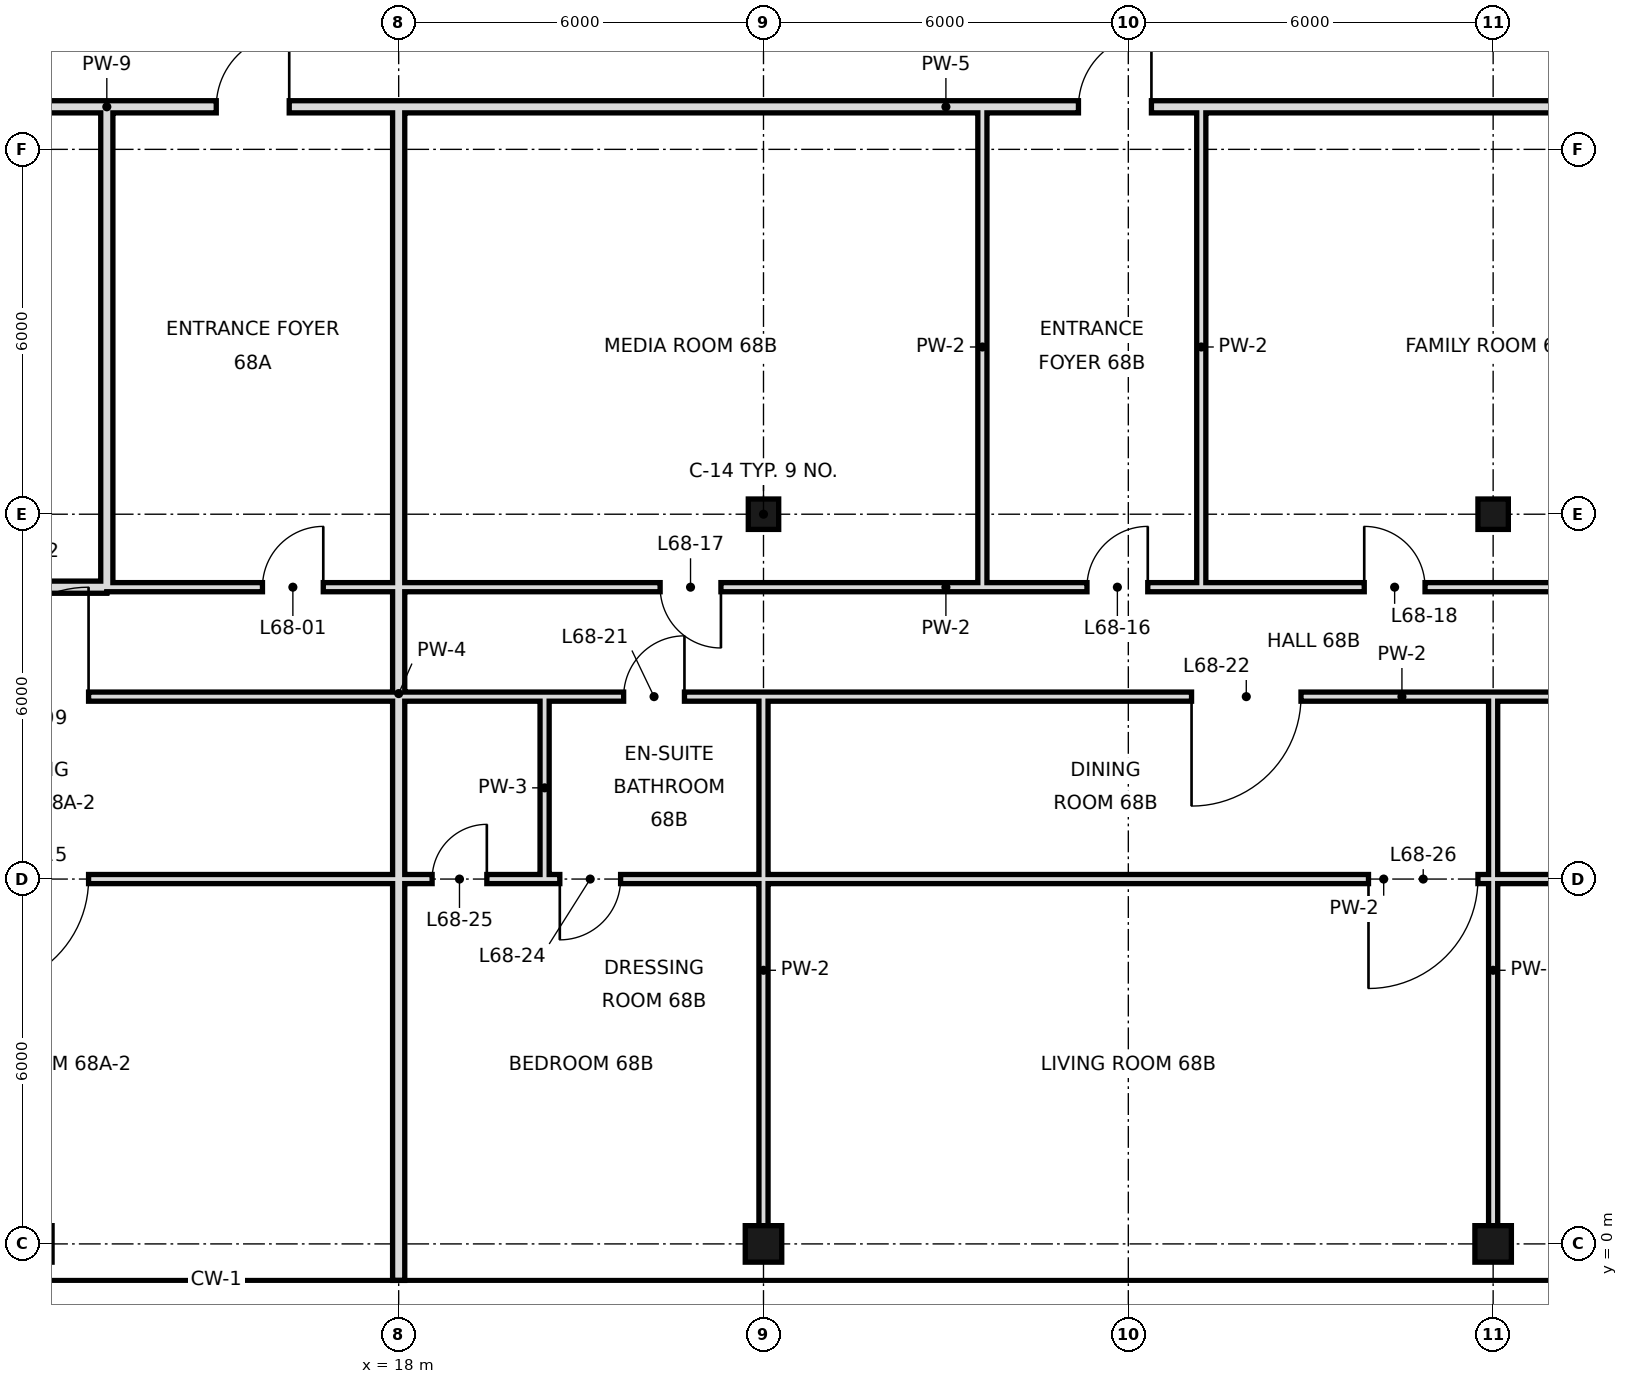
"""IFC4 building model, lengths in metres.
Left out: names, types, materials, properties, quantities, classifications, styles, units other than length and angle.
Written with IfcOpenShell. Run it as: python <this file> out.ifc"""

import sys

from ifc_helpers import new_model, si_unit, direction, frame, frame_2d, origin, origin_2d, place, context, subcontext, project, spatial, rectangle, hollow_rectangle, extrude, element, fill, save


model = new_model("IFC4")
c1 = context("Model", 3, precision=1e-05, world=origin(), true_north=direction((0.0, 1.0)))
c2 = subcontext(c1, "Body", "Model", "MODEL_VIEW")
j1 = project(units=[si_unit("LENGTHUNIT", "METRE"), si_unit("PLANEANGLEUNIT", "RADIAN")], contexts=[c1])
p1 = place(None, origin())
s1 = spatial("IfcSite", under=j1, at=p1, CompositionType="ELEMENT")
p2 = place(p1, origin())
s2 = spatial("IfcBuilding", under=s1, at=p2, CompositionType="ELEMENT")
p3 = place(p2, frame((0.0, 0.0, 290.8)))
s3 = spatial("IfcBuildingStorey", under=s2, at=p3, CompositionType="ELEMENT", Elevation=290.8)
p4 = place(p3, frame((24.0, 0.0, 0.0), z_axis=(0.0, 0.0, 1.0), x_axis=(1.0, 0.0, 0.0)))
e1 = element("IfcColumn", 1, at=p4, inside=s3, PredefinedType="COLUMN", context=c2, shape_type="SweptSolid", body=[
    extrude(hollow_rectangle(XDim=0.6, YDim=0.6, WallThickness=0.028, at=origin_2d()), origin(), (0.0, 0.0, 1.0), 3.6),
])
p5 = place(p3, frame((24.0, 12.0, 0.0), z_axis=(0.0, 0.0, 1.0), x_axis=(1.0, 0.0, 0.0)))
e2 = element("IfcColumn", 2, at=p5, inside=s3, PredefinedType="COLUMN", context=c2, shape_type="SweptSolid", body=[
    extrude(hollow_rectangle(XDim=0.5, YDim=0.5, WallThickness=0.025, at=origin_2d()), origin(), (0.0, 0.0, 1.0), 3.6),
])
p6 = place(p3, frame((36.0, 0.0, 0.0), z_axis=(0.0, 0.0, 1.0), x_axis=(1.0, 0.0, 0.0)))
e3 = element("IfcColumn", 3, at=p6, inside=s3, PredefinedType="COLUMN", context=c2, shape_type="SweptSolid", body=[
    extrude(hollow_rectangle(XDim=0.6, YDim=0.6, WallThickness=0.028, at=origin_2d()), origin(), (0.0, 0.0, 1.0), 3.6),
])
p7 = place(p3, frame((36.0, 12.0, 0.0), z_axis=(0.0, 0.0, 1.0), x_axis=(1.0, 0.0, 0.0)))
e4 = element("IfcColumn", 4, at=p7, inside=s3, PredefinedType="COLUMN", context=c2, shape_type="SweptSolid", body=[
    extrude(hollow_rectangle(XDim=0.5, YDim=0.5, WallThickness=0.025, at=origin_2d()), origin(), (0.0, 0.0, 1.0), 3.6),
])
p8 = place(p3, frame((13.2, 10.8, 0.0), z_axis=(0.0, 0.0, 1.0), x_axis=(0.0, 1.0, 0.0)))
e5 = element("IfcWall", 5, at=p8, inside=s3, PredefinedType="SOLIDWALL", context=c2, shape_type="SweptSolid", body=[
    extrude(rectangle(XDim=7.9, YDim=0.2, at=frame_2d((3.95, 0.0))), origin(), (0.0, 0.0, 1.0), 2.72),
])
p9 = place(p3, frame((18.0, -0.6, 0.0), z_axis=(0.0, 0.0, 1.0), x_axis=(0.0, 1.0, 0.0)))
e6 = element("IfcWall", 6, at=p9, inside=s3, PredefinedType="SOLIDWALL", context=c2, shape_type="SweptSolid", body=[
    extrude(rectangle(XDim=19.3, YDim=0.2, at=frame_2d((9.65, 0.0))), origin(), (0.0, 0.0, 1.0), 2.72),
])
p10 = place(p3, frame((20.4, 6.0, 0.0), z_axis=(0.0, 0.0, 1.0), x_axis=(0.0, 1.0, 0.0)))
e7 = element("IfcWall", 7, at=p10, inside=s3, PredefinedType="PARTITIONING", context=c2, shape_type="SweptSolid", body=[
    extrude(rectangle(XDim=3.0, YDim=0.15, at=frame_2d((1.5, 0.0))), origin(), (0.0, 0.0, 1.0), 3.42),
])
p11 = place(p3, frame((24.0, 0.0, 0.0), z_axis=(0.0, 0.0, 1.0), x_axis=(0.0, 1.0, 0.0)))
e8 = element("IfcWall", 8, at=p11, inside=s3, PredefinedType="PARTITIONING", context=c2, shape_type="SweptSolid", body=[
    extrude(rectangle(XDim=9.0, YDim=0.15, at=frame_2d((4.5, 0.0))), origin(), (0.0, 0.0, 1.0), 2.72),
])
for number, where, z_axis, x_axis in (
    (9, (27.6, 10.8, 0.0), (0.0, 0.0, 1.0), (0.0, 1.0, 0.0)),
    (10, (31.2, 10.8, 0.0), (0.0, 0.0, 1.0), (0.0, 1.0, 0.0)),
):
    element("IfcWall", number, at=place(p3, frame(where, z_axis=z_axis, x_axis=x_axis)), inside=s3, PredefinedType="PARTITIONING", context=c2, shape_type="SweptSolid", body=[
        extrude(rectangle(XDim=7.9, YDim=0.15, at=frame_2d((3.95, 0.0))), origin(), (0.0, 0.0, 1.0), 3.42),
    ])
p12 = place(p3, frame((36.0, 0.0, 0.0), z_axis=(0.0, 0.0, 1.0), x_axis=(0.0, 1.0, 0.0)))
e11 = element("IfcWall", 11, at=p12, inside=s3, PredefinedType="PARTITIONING", context=c2, shape_type="SweptSolid", body=[
    extrude(rectangle(XDim=9.0, YDim=0.15, at=frame_2d((4.5, 0.0))), origin(), (0.0, 0.0, 1.0), 2.72),
])
p13 = place(p3, frame((7.8, 10.8, 0.0), z_axis=(0.0, 0.0, 1.0), x_axis=(1.0, 0.0, 0.0)))
e12 = element("IfcWall", 12, at=p13, inside=s3, PredefinedType="SOLIDWALL", context=c2, shape_type="SweptSolid", body=[
    extrude(rectangle(XDim=5.4, YDim=0.2, at=frame_2d((2.7, 0.0))), origin(), (0.0, 0.0, 1.0), 2.72),
])
p14 = place(p13, frame((1.42, 0.0, 0.0)))
e13 = element("IfcOpeningElement", 13, at=p14, cuts=e12, PredefinedType="OPENING", context=c2, shape_type="SweptSolid", body=[
    extrude(rectangle(XDim=1.0, YDim=2.4, at=frame_2d((0.5, 1.2))), frame((0.0, 0.11, 0.0), z_axis=(0.0, -1.0, 0.0), x_axis=(1.0, 0.0, 0.0)), (0.0, 0.0, 1.0), 0.22),
])
p15 = place(p3, frame((13.2, 10.8, 0.0), z_axis=(0.0, 0.0, 1.0), x_axis=(1.0, 0.0, 0.0)))
e14 = element("IfcWall", 14, at=p15, inside=s3, PredefinedType="PARTITIONING", context=c2, shape_type="SweptSolid", body=[
    extrude(rectangle(XDim=27.6, YDim=0.15, at=frame_2d((13.8, 0.0))), origin(), (0.0, 0.0, 1.0), 3.42),
])
p16 = place(p15, frame((2.56, 0.0, 0.0)))
e15 = element("IfcOpeningElement", 15, at=p16, cuts=e14, PredefinedType="OPENING", context=c2, shape_type="SweptSolid", body=[
    extrude(rectangle(XDim=1.0, YDim=2.4, at=frame_2d((0.5, 1.2))), frame((0.0, 0.085, 0.0), z_axis=(0.0, -1.0, 0.0), x_axis=(1.0, 0.0, 0.0)), (0.0, 0.0, 1.0), 0.17),
])
p17 = place(p15, frame((16.12, 0.0, 0.0)))
e16 = element("IfcOpeningElement", 16, at=p17, cuts=e14, PredefinedType="OPENING", context=c2, shape_type="SweptSolid", body=[
    extrude(rectangle(XDim=1.0, YDim=2.4, at=frame_2d((0.5, 1.2))), frame((0.0, 0.085, 0.0), z_axis=(0.0, -1.0, 0.0), x_axis=(1.0, 0.0, 0.0)), (0.0, 0.0, 1.0), 0.17),
])
p18 = place(p15, frame((9.1, 0.0, 0.0)))
e17 = element("IfcOpeningElement", 17, at=p18, cuts=e14, PredefinedType="OPENING", context=c2, shape_type="SweptSolid", body=[
    extrude(rectangle(XDim=1.0, YDim=2.4, at=frame_2d((0.5, 1.2))), frame((0.0, 0.085, 0.0), z_axis=(0.0, -1.0, 0.0), x_axis=(1.0, 0.0, 0.0)), (0.0, 0.0, 1.0), 0.17),
])
p19 = place(p15, frame((20.68, 0.0, 0.0)))
e18 = element("IfcOpeningElement", 18, at=p19, cuts=e14, PredefinedType="OPENING", context=c2, shape_type="SweptSolid", body=[
    extrude(rectangle(XDim=1.0, YDim=2.4, at=frame_2d((0.5, 1.2))), frame((0.0, 0.085, 0.0), z_axis=(0.0, -1.0, 0.0), x_axis=(1.0, 0.0, 0.0)), (0.0, 0.0, 1.0), 0.17),
])
p20 = place(p3, frame((13.2, 18.7, 0.0), z_axis=(0.0, 0.0, 1.0), x_axis=(1.0, 0.0, 0.0)))
e19 = element("IfcWall", 19, at=p20, inside=s3, PredefinedType="SOLIDWALL", context=c2, shape_type="SweptSolid", body=[
    extrude(rectangle(XDim=27.6, YDim=0.2, at=frame_2d((13.8, 0.0))), origin(), (0.0, 0.0, 1.0), 2.72),
])
p21 = place(p20, frame((1.8, 0.0, 0.0)))
e20 = element("IfcOpeningElement", 20, at=p21, cuts=e19, PredefinedType="OPENING", context=c2, shape_type="SweptSolid", body=[
    extrude(rectangle(XDim=1.2, YDim=2.4, at=frame_2d((0.6, 1.2))), frame((0.0, 0.11, 0.0), z_axis=(0.0, -1.0, 0.0), x_axis=(1.0, 0.0, 0.0)), (0.0, 0.0, 1.0), 0.22),
])
p22 = place(p20, frame((15.98, 0.0, 0.0)))
e21 = element("IfcOpeningElement", 21, at=p22, cuts=e19, PredefinedType="OPENING", context=c2, shape_type="SweptSolid", body=[
    extrude(rectangle(XDim=1.2, YDim=2.4, at=frame_2d((0.6, 1.2))), frame((0.0, 0.11, 0.0), z_axis=(0.0, -1.0, 0.0), x_axis=(1.0, 0.0, 0.0)), (0.0, 0.0, 1.0), 0.22),
])
p23 = place(p3, frame((7.8, 18.7, 0.0), z_axis=(0.0, 0.0, 1.0), x_axis=(1.0, 0.0, 0.0)))
e22 = element("IfcWall", 22, at=p23, inside=s3, PredefinedType="SOLIDWALL", context=c2, shape_type="SweptSolid", body=[
    extrude(rectangle(XDim=5.4, YDim=0.2, at=frame_2d((2.7, 0.0))), origin(), (0.0, 0.0, 1.0), 3.42),
])
p24 = place(p3, frame((6.0, 6.0, 0.0), z_axis=(0.0, 0.0, 1.0), x_axis=(1.0, 0.0, 0.0)))
e23 = element("IfcWall", 23, at=p24, inside=s3, PredefinedType="PARTITIONING", context=c2, shape_type="SweptSolid", body=[
    extrude(rectangle(XDim=12.0, YDim=0.15, at=frame_2d((6.0, 0.0))), origin(), (0.0, 0.0, 1.0), 2.97),
])
p25 = place(p24, frame((5.1, 0.0, 0.0)))
e24 = element("IfcOpeningElement", 24, at=p25, cuts=e23, PredefinedType="OPENING", context=c2, shape_type="SweptSolid", body=[
    extrude(rectangle(XDim=1.8, YDim=2.4, at=frame_2d((0.9, 1.2))), frame((0.0, 0.085, 0.0), z_axis=(0.0, -1.0, 0.0), x_axis=(1.0, 0.0, 0.0)), (0.0, 0.0, 1.0), 0.17),
])
p26 = place(p3, frame((20.4, 6.0, 0.0), z_axis=(0.0, 0.0, 1.0), x_axis=(1.0, 0.0, 0.0)))
e25 = element("IfcWall", 25, at=p26, inside=s3, PredefinedType="PARTITIONING", context=c2, shape_type="SweptSolid", body=[
    extrude(rectangle(XDim=27.6, YDim=0.15, at=frame_2d((13.8, 0.0))), origin(), (0.0, 0.0, 1.0), 2.97),
])
p27 = place(p26, frame((0.25, 0.0, 0.0)))
e26 = element("IfcOpeningElement", 26, at=p27, cuts=e25, PredefinedType="OPENING", context=c2, shape_type="SweptSolid", body=[
    extrude(rectangle(XDim=1.0, YDim=2.4, at=frame_2d((0.5, 1.2))), frame((0.0, 0.085, 0.0), z_axis=(0.0, -1.0, 0.0), x_axis=(1.0, 0.0, 0.0)), (0.0, 0.0, 1.0), 0.17),
])
p28 = place(p26, frame((13.55, 0.0, 0.0)))
e27 = element("IfcOpeningElement", 27, at=p28, cuts=e25, PredefinedType="OPENING", context=c2, shape_type="SweptSolid", body=[
    extrude(rectangle(XDim=1.8, YDim=2.4, at=frame_2d((0.9, 1.2))), frame((0.0, 0.085, 0.0), z_axis=(0.0, -1.0, 0.0), x_axis=(1.0, 0.0, 0.0)), (0.0, 0.0, 1.0), 0.17),
])
p29 = place(p26, frame((21.1, 0.0, 0.0)))
e28 = element("IfcOpeningElement", 28, at=p29, cuts=e25, PredefinedType="OPENING", context=c2, shape_type="SweptSolid", body=[
    extrude(rectangle(XDim=1.0, YDim=2.4, at=frame_2d((0.5, 1.2))), frame((0.0, 0.085, 0.0), z_axis=(0.0, -1.0, 0.0), x_axis=(1.0, 0.0, 0.0)), (0.0, 0.0, 1.0), 0.17),
])
p30 = place(p3, frame((18.0, 6.0, 0.0), z_axis=(0.0, 0.0, 1.0), x_axis=(1.0, 0.0, 0.0)))
e29 = element("IfcWall", 29, at=p30, inside=s3, PredefinedType="PARTITIONING", context=c2, shape_type="SweptSolid", body=[
    extrude(rectangle(XDim=2.4, YDim=0.15, at=frame_2d((1.2, 0.0))), origin(), (0.0, 0.0, 1.0), 2.97),
])
p31 = place(p30, frame((0.55, 0.0, 0.0)))
e30 = element("IfcOpeningElement", 30, at=p31, cuts=e29, PredefinedType="OPENING", context=c2, shape_type="SweptSolid", body=[
    extrude(rectangle(XDim=0.9, YDim=2.4, at=frame_2d((0.45, 1.2))), frame((0.0, 0.085, 0.0), z_axis=(0.0, -1.0, 0.0), x_axis=(1.0, 0.0, 0.0)), (0.0, 0.0, 1.0), 0.17),
])
p32 = place(p3, frame((6.0, 9.0, 0.0), z_axis=(0.0, 0.0, 1.0), x_axis=(1.0, 0.0, 0.0)))
e31 = element("IfcWall", 31, at=p32, inside=s3, PredefinedType="PARTITIONING", context=c2, shape_type="SweptSolid", body=[
    extrude(rectangle(XDim=12.0, YDim=0.15, at=frame_2d((6.0, 0.0))), origin(), (0.0, 0.0, 1.0), 3.42),
])
p33 = place(p32, frame((5.1, 0.0, 0.0)))
e32 = element("IfcOpeningElement", 32, at=p33, cuts=e31, PredefinedType="OPENING", context=c2, shape_type="SweptSolid", body=[
    extrude(rectangle(XDim=1.8, YDim=2.4, at=frame_2d((0.9, 1.2))), frame((0.0, 0.085, 0.0), z_axis=(0.0, -1.0, 0.0), x_axis=(1.0, 0.0, 0.0)), (0.0, 0.0, 1.0), 0.17),
])
p34 = place(p3, frame((20.4, 9.0, 0.0), z_axis=(0.0, 0.0, 1.0), x_axis=(1.0, 0.0, 0.0)))
e33 = element("IfcWall", 33, at=p34, inside=s3, PredefinedType="PARTITIONING", context=c2, shape_type="SweptSolid", body=[
    extrude(rectangle(XDim=28.2, YDim=0.15, at=frame_2d((14.1, 0.0))), origin(), (0.0, 0.0, 1.0), 3.42),
])
p35 = place(p34, frame((1.3, 0.0, 0.0)))
e34 = element("IfcOpeningElement", 34, at=p35, cuts=e33, PredefinedType="OPENING", context=c2, shape_type="SweptSolid", body=[
    extrude(rectangle(XDim=1.0, YDim=2.4, at=frame_2d((0.5, 1.2))), frame((0.0, 0.085, 0.0), z_axis=(0.0, -1.0, 0.0), x_axis=(1.0, 0.0, 0.0)), (0.0, 0.0, 1.0), 0.17),
])
p36 = place(p34, frame((10.64, 0.0, 0.0)))
e35 = element("IfcOpeningElement", 35, at=p36, cuts=e33, PredefinedType="OPENING", context=c2, shape_type="SweptSolid", body=[
    extrude(rectangle(XDim=1.8, YDim=2.4, at=frame_2d((0.9, 1.2))), frame((0.0, 0.085, 0.0), z_axis=(0.0, -1.0, 0.0), x_axis=(1.0, 0.0, 0.0)), (0.0, 0.0, 1.0), 0.17),
])
p37 = place(p34, frame((23.2, 0.0, 0.0)))
e36 = element("IfcOpeningElement", 36, at=p37, cuts=e33, PredefinedType="OPENING", context=c2, shape_type="SweptSolid", body=[
    extrude(rectangle(XDim=1.0, YDim=2.4, at=frame_2d((0.5, 1.2))), frame((0.0, 0.085, 0.0), z_axis=(0.0, -1.0, 0.0), x_axis=(1.0, 0.0, 0.0)), (0.0, 0.0, 1.0), 0.17),
])
p38 = place(p3, frame((18.0, 9.0, 0.0), z_axis=(0.0, 0.0, 1.0), x_axis=(1.0, 0.0, 0.0)))
e37 = element("IfcWall", 37, at=p38, inside=s3, PredefinedType="PARTITIONING", context=c2, shape_type="SweptSolid", body=[
    extrude(rectangle(XDim=2.4, YDim=0.15, at=frame_2d((1.2, 0.0))), origin(), (0.0, 0.0, 1.0), 3.42),
])
p39 = place(p16, frame((1.0, 0.0, 0.0), z_axis=(0.0, 0.0, 1.0), x_axis=(-1.0, 0.0, 0.0)))
e38 = element("IfcDoor", 38, at=p39, inside=s3, OperationType="SINGLE_SWING_LEFT", PredefinedType="DOOR", context=c2, shape_type="SweptSolid", body=[
    extrude(rectangle(XDim=1.0, YDim=2.4, at=frame_2d((0.5, 1.2))), frame((0.0, 0.025, 0.0), z_axis=(0.0, -1.0, 0.0), x_axis=(1.0, 0.0, 0.0)), (0.0, 0.0, 1.0), 0.05),
])
fill(e15, e38)
p40 = place(p33, frame((1.8, 0.0, 0.0), z_axis=(0.0, 0.0, 1.0), x_axis=(-1.0, 0.0, 0.0)))
e39 = element("IfcDoor", 39, at=p40, inside=s3, OperationType="SINGLE_SWING_LEFT", PredefinedType="DOOR", context=c2, shape_type="SweptSolid", body=[
    extrude(rectangle(XDim=1.8, YDim=2.4, at=frame_2d((0.9, 1.2))), frame((0.0, 0.025, 0.0), z_axis=(0.0, -1.0, 0.0), x_axis=(1.0, 0.0, 0.0)), (0.0, 0.0, 1.0), 0.05),
])
fill(e32, e39)
p41 = place(p25, frame((1.8, 0.0, 0.0), z_axis=(0.0, 0.0, 1.0), x_axis=(-1.0, 0.0, 0.0)))
e40 = element("IfcDoor", 40, at=p41, inside=s3, OperationType="SINGLE_SWING_RIGHT", PredefinedType="DOOR", context=c2, shape_type="SweptSolid", body=[
    extrude(rectangle(XDim=1.8, YDim=2.4, at=frame_2d((0.9, 1.2))), frame((0.0, 0.025, 0.0), z_axis=(0.0, -1.0, 0.0), x_axis=(1.0, 0.0, 0.0)), (0.0, 0.0, 1.0), 0.05),
])
fill(e24, e40)
p42 = place(p17, frame((1.0, 0.0, 0.0), z_axis=(0.0, 0.0, 1.0), x_axis=(-1.0, 0.0, 0.0)))
e41 = element("IfcDoor", 41, at=p42, inside=s3, OperationType="SINGLE_SWING_LEFT", PredefinedType="DOOR", context=c2, shape_type="SweptSolid", body=[
    extrude(rectangle(XDim=1.0, YDim=2.4, at=frame_2d((0.5, 1.2))), frame((0.0, 0.025, 0.0), z_axis=(0.0, -1.0, 0.0), x_axis=(1.0, 0.0, 0.0)), (0.0, 0.0, 1.0), 0.05),
])
fill(e16, e41)
p43 = place(p18, origin())
e42 = element("IfcDoor", 42, at=p43, inside=s3, OperationType="SINGLE_SWING_RIGHT", PredefinedType="DOOR", context=c2, shape_type="SweptSolid", body=[
    extrude(rectangle(XDim=1.0, YDim=2.4, at=frame_2d((0.5, 1.2))), frame((0.0, 0.025, 0.0), z_axis=(0.0, -1.0, 0.0), x_axis=(1.0, 0.0, 0.0)), (0.0, 0.0, 1.0), 0.05),
])
fill(e17, e42)
p44 = place(p19, origin())
e43 = element("IfcDoor", 43, at=p44, inside=s3, OperationType="SINGLE_SWING_LEFT", PredefinedType="DOOR", context=c2, shape_type="SweptSolid", body=[
    extrude(rectangle(XDim=1.0, YDim=2.4, at=frame_2d((0.5, 1.2))), frame((0.0, 0.025, 0.0), z_axis=(0.0, -1.0, 0.0), x_axis=(1.0, 0.0, 0.0)), (0.0, 0.0, 1.0), 0.05),
])
fill(e18, e43)
p45 = place(p35, frame((1.0, 0.0, 0.0), z_axis=(0.0, 0.0, 1.0), x_axis=(-1.0, 0.0, 0.0)))
e44 = element("IfcDoor", 44, at=p45, inside=s3, OperationType="SINGLE_SWING_LEFT", PredefinedType="DOOR", context=c2, shape_type="SweptSolid", body=[
    extrude(rectangle(XDim=1.0, YDim=2.4, at=frame_2d((0.5, 1.2))), frame((0.0, 0.025, 0.0), z_axis=(0.0, -1.0, 0.0), x_axis=(1.0, 0.0, 0.0)), (0.0, 0.0, 1.0), 0.05),
])
fill(e34, e44)
p46 = place(p36, frame((1.8, 0.0, 0.0), z_axis=(0.0, 0.0, 1.0), x_axis=(-1.0, 0.0, 0.0)))
e45 = element("IfcDoor", 45, at=p46, inside=s3, OperationType="SINGLE_SWING_RIGHT", PredefinedType="DOOR", context=c2, shape_type="SweptSolid", body=[
    extrude(rectangle(XDim=1.8, YDim=2.4, at=frame_2d((0.9, 1.2))), frame((0.0, 0.025, 0.0), z_axis=(0.0, -1.0, 0.0), x_axis=(1.0, 0.0, 0.0)), (0.0, 0.0, 1.0), 0.05),
])
fill(e35, e45)
p47 = place(p27, frame((1.0, 0.0, 0.0), z_axis=(0.0, 0.0, 1.0), x_axis=(-1.0, 0.0, 0.0)))
e46 = element("IfcDoor", 46, at=p47, inside=s3, OperationType="SINGLE_SWING_RIGHT", PredefinedType="DOOR", context=c2, shape_type="SweptSolid", body=[
    extrude(rectangle(XDim=1.0, YDim=2.4, at=frame_2d((0.5, 1.2))), frame((0.0, 0.025, 0.0), z_axis=(0.0, -1.0, 0.0), x_axis=(1.0, 0.0, 0.0)), (0.0, 0.0, 1.0), 0.05),
])
fill(e26, e46)
p48 = place(p31, frame((0.9, 0.0, 0.0), z_axis=(0.0, 0.0, 1.0), x_axis=(-1.0, 0.0, 0.0)))
e47 = element("IfcDoor", 47, at=p48, inside=s3, OperationType="SINGLE_SWING_LEFT", PredefinedType="DOOR", context=c2, shape_type="SweptSolid", body=[
    extrude(rectangle(XDim=0.9, YDim=2.4, at=frame_2d((0.45, 1.2))), frame((0.0, 0.025, 0.0), z_axis=(0.0, -1.0, 0.0), x_axis=(1.0, 0.0, 0.0)), (0.0, 0.0, 1.0), 0.05),
])
fill(e30, e47)
p49 = place(p28, frame((1.8, 0.0, 0.0), z_axis=(0.0, 0.0, 1.0), x_axis=(-1.0, 0.0, 0.0)))
e48 = element("IfcDoor", 48, at=p49, inside=s3, OperationType="SINGLE_SWING_RIGHT", PredefinedType="DOOR", context=c2, shape_type="SweptSolid", body=[
    extrude(rectangle(XDim=1.8, YDim=2.4, at=frame_2d((0.9, 1.2))), frame((0.0, 0.025, 0.0), z_axis=(0.0, -1.0, 0.0), x_axis=(1.0, 0.0, 0.0)), (0.0, 0.0, 1.0), 0.05),
])
fill(e27, e48)
p50 = place(p21, frame((1.2, 0.0, 0.0), z_axis=(0.0, 0.0, 1.0), x_axis=(-1.0, 0.0, 0.0)))
e49 = element("IfcDoor", 49, at=p50, inside=s3, OperationType="SINGLE_SWING_LEFT", PredefinedType="DOOR", context=c2, shape_type="SweptSolid", body=[
    extrude(rectangle(XDim=1.2, YDim=2.4, at=frame_2d((0.6, 1.2))), frame((0.0, 0.025, 0.0), z_axis=(0.0, -1.0, 0.0), x_axis=(1.0, 0.0, 0.0)), (0.0, 0.0, 1.0), 0.05),
])
fill(e20, e49)
p51 = place(p22, frame((1.2, 0.0, 0.0), z_axis=(0.0, 0.0, 1.0), x_axis=(-1.0, 0.0, 0.0)))
e50 = element("IfcDoor", 50, at=p51, inside=s3, OperationType="SINGLE_SWING_LEFT", PredefinedType="DOOR", context=c2, shape_type="SweptSolid", body=[
    extrude(rectangle(XDim=1.2, YDim=2.4, at=frame_2d((0.6, 1.2))), frame((0.0, 0.025, 0.0), z_axis=(0.0, -1.0, 0.0), x_axis=(1.0, 0.0, 0.0)), (0.0, 0.0, 1.0), 0.05),
])
fill(e21, e50)
save(model, sys.argv[1])
